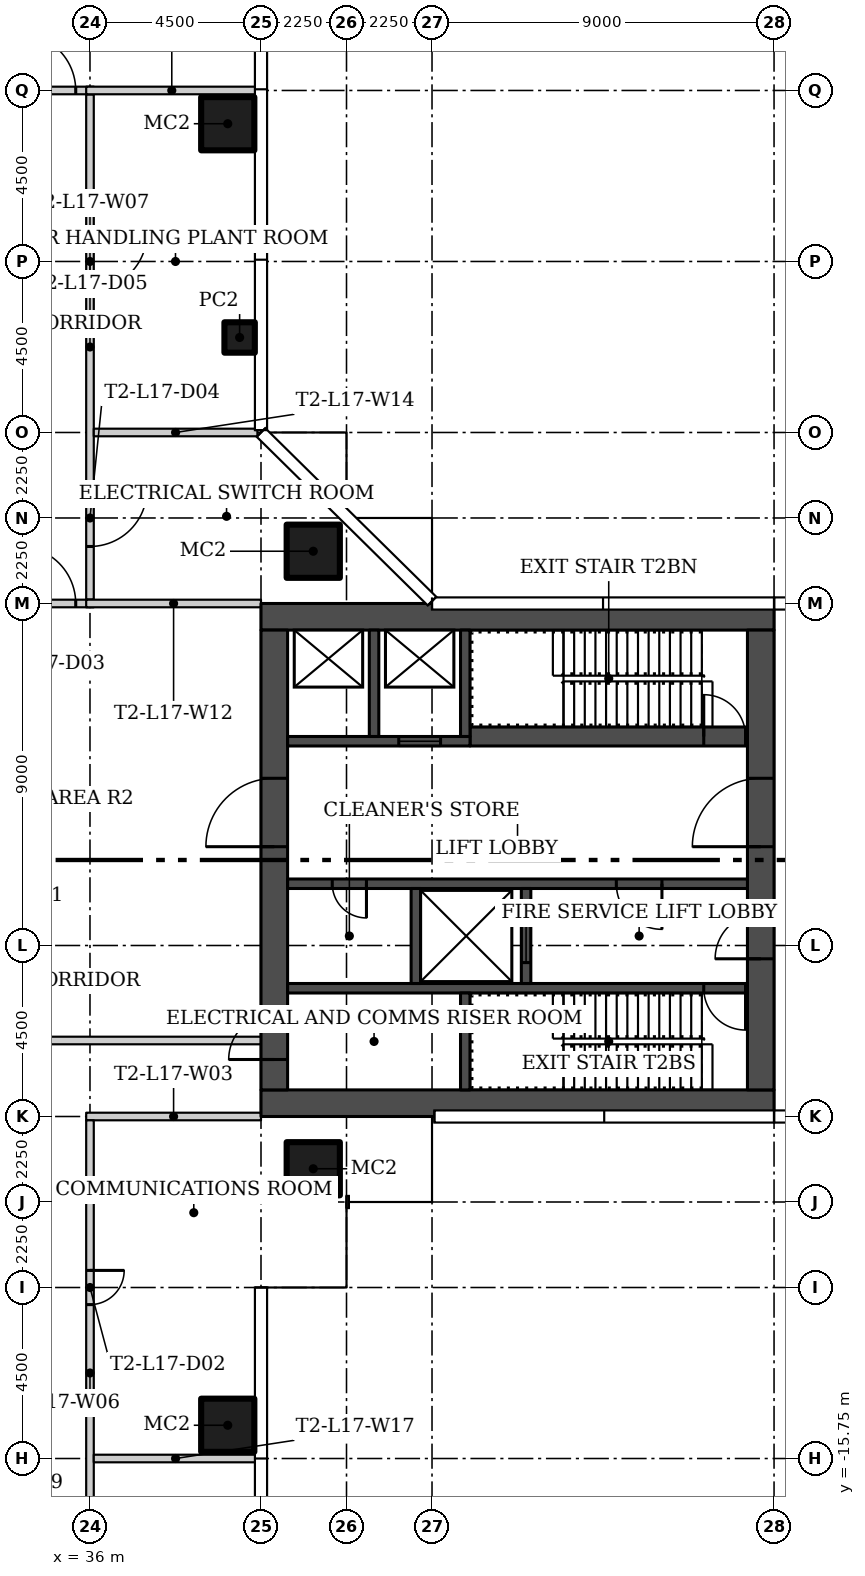
"""IFC4 building model, lengths in metres.
Left out: names, types, materials, properties, quantities, classifications, styles, units other than length and angle.
Written with IfcOpenShell. Run it as: python <this file> out.ifc"""

import sys

from ifc_helpers import new_model, si_unit, direction, frame, frame_2d, origin, origin_2d, place, context, subcontext, project, spatial, rectangle, hollow_rectangle, extrude, element, fill, save


model = new_model("IFC4")
c1 = context("Model", 3, precision=1e-05, world=origin(), true_north=direction((0.0, 1.0)))
c2 = subcontext(c1, "Body", "Model", "MODEL_VIEW")
j1 = project(units=[si_unit("LENGTHUNIT", "METRE"), si_unit("PLANEANGLEUNIT", "RADIAN")], contexts=[c1])
p1 = place(None, origin())
s1 = spatial("IfcSite", under=j1, at=p1, CompositionType="ELEMENT")
p2 = place(p1, origin())
s2 = spatial("IfcBuilding", under=s1, at=p2, CompositionType="ELEMENT")
p3 = place(p2, frame((0.0, 0.0, 77.1)))
s3 = spatial("IfcBuildingStorey", under=s2, at=p3, CompositionType="ELEMENT", Elevation=77.1)
for number, where in (
    (1, (41.875, 8.125, 0.0)),
    (2, (41.875, -8.125, 0.0)),
):
    element("IfcColumn", number, at=place(p3, frame(where)), inside=s3, PredefinedType="COLUMN", context=c2, shape_type="SweptSolid", body=[
        extrude(hollow_rectangle(XDim=1.4, YDim=1.4, WallThickness=0.05, at=origin_2d()), origin(), (0.0, 0.0, 1.0), 4.45),
    ])
p4 = place(p3, frame((39.938, 13.75, 0.0)))
e3 = element("IfcColumn", 3, at=p4, inside=s3, PredefinedType="COLUMN", context=c2, shape_type="SweptSolid", body=[
    extrude(hollow_rectangle(XDim=0.8, YDim=0.8, WallThickness=0.025, at=origin_2d()), origin(), (0.0, 0.0, 1.0), 4.45),
])
for number, where in (
    (4, (39.625, 19.375, 0.0)),
    (5, (39.625, -14.875, 0.0)),
):
    element("IfcColumn", number, at=place(p3, frame(where)), inside=s3, PredefinedType="COLUMN", context=c2, shape_type="SweptSolid", body=[
        extrude(hollow_rectangle(XDim=1.4, YDim=1.4, WallThickness=0.05, at=origin_2d()), origin(), (0.0, 0.0, 1.0), 4.45),
    ])
p5 = place(p3, frame((40.5, -4.75, 0.0), z_axis=(0.0, 0.0, 1.0), x_axis=(-1.0, 0.0, 0.0)))
e6 = element("IfcWall", 6, at=p5, inside=s3, PredefinedType="PARTITIONING", context=c2, shape_type="SweptSolid", body=[
    extrude(rectangle(XDim=13.5, YDim=0.2, at=frame_2d((6.75, 0.0))), origin(), (0.0, 0.0, 1.0), 4.45),
])
p6 = place(p5, frame((6.0, 0.0, 0.0)))
e7 = element("IfcOpeningElement", 7, at=p6, cuts=e6, PredefinedType="OPENING", context=c2, shape_type="SweptSolid", body=[
    extrude(rectangle(XDim=1.5, YDim=2.4, at=frame_2d((0.75, 1.2))), frame((0.0, 0.11, 0.0), z_axis=(0.0, -1.0, 0.0), x_axis=(1.0, 0.0, 0.0)), (0.0, 0.0, 1.0), 0.22),
])
p7 = place(p3, frame((40.5, -6.75, 0.0), z_axis=(0.0, 0.0, 1.0), x_axis=(-1.0, 0.0, 0.0)))
e8 = element("IfcWall", 8, at=p7, inside=s3, PredefinedType="PARTITIONING", context=c2, shape_type="SweptSolid", body=[
    extrude(rectangle(XDim=4.6, YDim=0.2, at=frame_2d((2.3, 0.0))), origin(), (0.0, 0.0, 1.0), 4.45),
])
p8 = place(p3, frame((36.0, -6.85, 0.0), z_axis=(0.0, 0.0, 1.0), x_axis=(0.0, -1.0, 0.0)))
e9 = element("IfcWall", 9, at=p8, inside=s3, PredefinedType="PARTITIONING", context=c2, shape_type="SweptSolid", body=[
    extrude(rectangle(XDim=13.3, YDim=0.2, at=frame_2d((6.65, 0.0))), origin(), (0.0, 0.0, 1.0), 4.45),
])
p9 = place(p8, frame((10.4, 0.0, 0.0)))
e10 = element("IfcOpeningElement", 10, at=p9, cuts=e9, PredefinedType="OPENING", context=c2, shape_type="SweptSolid", body=[
    extrude(rectangle(XDim=1.5, YDim=2.4, at=frame_2d((0.75, 1.2))), frame((0.0, 0.11, 0.0), z_axis=(0.0, -1.0, 0.0), x_axis=(1.0, 0.0, 0.0)), (0.0, 0.0, 1.0), 0.22),
])
p10 = place(p8, frame((3.95, 0.0, 0.0)))
e11 = element("IfcOpeningElement", 11, at=p10, cuts=e9, PredefinedType="OPENING", context=c2, shape_type="SweptSolid", body=[
    extrude(rectangle(XDim=0.9, YDim=2.1, at=frame_2d((0.45, 1.05))), frame((0.0, 0.11, 0.0), z_axis=(0.0, -1.0, 0.0), x_axis=(1.0, 0.0, 0.0)), (0.0, 0.0, 1.0), 0.22),
])
p11 = place(p3, frame((36.0, 20.15, 0.0), z_axis=(0.0, 0.0, 1.0), x_axis=(0.0, -1.0, 0.0)))
e12 = element("IfcWall", 12, at=p11, inside=s3, PredefinedType="PARTITIONING", context=c2, shape_type="SweptSolid", body=[
    extrude(rectangle(XDim=13.3, YDim=0.2, at=frame_2d((6.65, 0.0))), origin(), (0.0, 0.0, 1.0), 4.45),
])
p12 = place(p11, frame((10.4, 0.0, 0.0)))
e13 = element("IfcOpeningElement", 13, at=p12, cuts=e12, PredefinedType="OPENING", context=c2, shape_type="SweptSolid", body=[
    extrude(rectangle(XDim=1.5, YDim=2.4, at=frame_2d((0.75, 1.2))), frame((0.0, 0.11, 0.0), z_axis=(0.0, -1.0, 0.0), x_axis=(1.0, 0.0, 0.0)), (0.0, 0.0, 1.0), 0.22),
])
p13 = place(p11, frame((3.65, 0.0, 0.0)))
e14 = element("IfcOpeningElement", 14, at=p13, cuts=e12, PredefinedType="OPENING", context=c2, shape_type="SweptSolid", body=[
    extrude(rectangle(XDim=1.5, YDim=2.4, at=frame_2d((0.75, 1.2))), frame((0.0, 0.11, 0.0), z_axis=(0.0, -1.0, 0.0), x_axis=(1.0, 0.0, 0.0)), (0.0, 0.0, 1.0), 0.22),
])
p14 = place(p3, frame((33.65, 6.75, 0.0)))
e15 = element("IfcWall", 15, at=p14, inside=s3, PredefinedType="PARTITIONING", context=c2, shape_type="SweptSolid", body=[
    extrude(rectangle(XDim=2.45, YDim=0.2, at=frame_2d((1.225, 0.0))), origin(), (0.0, 0.0, 1.0), 4.45),
])
p15 = place(p14, frame((0.475, 0.0, 0.0)))
e16 = element("IfcOpeningElement", 16, at=p15, cuts=e15, PredefinedType="OPENING", context=c2, shape_type="SweptSolid", body=[
    extrude(rectangle(XDim=1.5, YDim=2.4, at=frame_2d((0.75, 1.2))), frame((0.0, 0.11, 0.0), z_axis=(0.0, -1.0, 0.0), x_axis=(1.0, 0.0, 0.0)), (0.0, 0.0, 1.0), 0.22),
])
p16 = place(p3, frame((33.65, 20.25, 0.0)))
e17 = element("IfcWall", 17, at=p16, inside=s3, PredefinedType="PARTITIONING", context=c2, shape_type="SweptSolid", body=[
    extrude(rectangle(XDim=2.45, YDim=0.2, at=frame_2d((1.225, 0.0))), origin(), (0.0, 0.0, 1.0), 4.45),
])
p17 = place(p16, frame((0.475, 0.0, 0.0)))
e18 = element("IfcOpeningElement", 18, at=p17, cuts=e17, PredefinedType="OPENING", context=c2, shape_type="SweptSolid", body=[
    extrude(rectangle(XDim=1.5, YDim=2.4, at=frame_2d((0.75, 1.2))), frame((0.0, 0.11, 0.0), z_axis=(0.0, -1.0, 0.0), x_axis=(1.0, 0.0, 0.0)), (0.0, 0.0, 1.0), 0.22),
])
p18 = place(p3, frame((40.5, 6.75, 0.0), z_axis=(0.0, 0.0, 1.0), x_axis=(-1.0, 0.0, 0.0)))
e19 = element("IfcWall", 19, at=p18, inside=s3, PredefinedType="PARTITIONING", context=c2, shape_type="SweptSolid", body=[
    extrude(rectangle(XDim=4.6, YDim=0.2, at=frame_2d((2.3, 0.0))), origin(), (0.0, 0.0, 1.0), 4.45),
])
p19 = place(p3, frame((40.405, 11.25, 0.0), z_axis=(0.0, 0.0, 1.0), x_axis=(-1.0, 0.0, 0.0)))
e20 = element("IfcWall", 20, at=p19, inside=s3, PredefinedType="PARTITIONING", context=c2, shape_type="SweptSolid", body=[
    extrude(rectangle(XDim=4.305, YDim=0.2, at=frame_2d((2.152, 0.0))), origin(), (0.0, 0.0, 1.0), 4.45),
])
p20 = place(p3, frame((40.405, 20.25, 0.0), z_axis=(0.0, 0.0, 1.0), x_axis=(-1.0, 0.0, 0.0)))
e21 = element("IfcWall", 21, at=p20, inside=s3, PredefinedType="PARTITIONING", context=c2, shape_type="SweptSolid", body=[
    extrude(rectangle(XDim=4.505, YDim=0.2, at=frame_2d((2.252, 0.0))), origin(), (0.0, 0.0, 1.0), 4.45),
])
p21 = place(p3, frame((36.1, -15.75, 0.0)))
e22 = element("IfcWall", 22, at=p21, inside=s3, PredefinedType="PARTITIONING", context=c2, shape_type="SweptSolid", body=[
    extrude(rectangle(XDim=4.305, YDim=0.2, at=frame_2d((2.152, 0.0))), origin(), (0.0, 0.0, 1.0), 4.45),
])
for number, where, z_axis, x_axis in (
    (23, (54.0, -6.4, 0.0), (0.0, 0.0, 1.0), (-1.0, 0.0, 0.0)),
    (24, (54.0, 6.4, 0.0), (0.0, 0.0, 1.0), (-1.0, 0.0, 0.0)),
):
    element("IfcWall", number, at=place(p3, frame(where, z_axis=z_axis, x_axis=x_axis)), inside=s3, PredefinedType="SHEAR", context=c2, shape_type="SweptSolid", body=[
        extrude(rectangle(XDim=13.5, YDim=0.7, at=frame_2d((6.75, 0.0))), origin(), (0.0, 0.0, 1.0), 4.45),
    ])
p22 = place(p3, frame((53.65, -6.05, 0.0), z_axis=(0.0, 0.0, 1.0), x_axis=(0.0, 1.0, 0.0)))
e25 = element("IfcWall", 25, at=p22, inside=s3, PredefinedType="SHEAR", context=c2, shape_type="SweptSolid", body=[
    extrude(rectangle(XDim=12.1, YDim=0.7, at=frame_2d((6.05, 0.0))), origin(), (0.0, 0.0, 1.0), 4.45),
])
p23 = place(p22, frame((3.45, 0.0, 0.0)))
e26 = element("IfcOpeningElement", 26, at=p23, cuts=e25, PredefinedType="OPENING", context=c2, shape_type="SweptSolid", body=[
    extrude(rectangle(XDim=1.2, YDim=2.1, at=frame_2d((0.6, 1.05))), frame((0.0, 0.36, 0.0), z_axis=(0.0, -1.0, 0.0), x_axis=(1.0, 0.0, 0.0)), (0.0, 0.0, 1.0), 0.72),
])
p24 = place(p22, frame((6.4, 0.0, 0.0)))
e27 = element("IfcOpeningElement", 27, at=p24, cuts=e25, PredefinedType="OPENING", context=c2, shape_type="SweptSolid", body=[
    extrude(rectangle(XDim=1.8, YDim=2.4, at=frame_2d((0.9, 1.2))), frame((0.0, 0.36, 0.0), z_axis=(0.0, -1.0, 0.0), x_axis=(1.0, 0.0, 0.0)), (0.0, 0.0, 1.0), 0.72),
])
p25 = place(p3, frame((40.85, -6.05, 0.0), z_axis=(0.0, 0.0, 1.0), x_axis=(0.0, 1.0, 0.0)))
e28 = element("IfcWall", 28, at=p25, inside=s3, PredefinedType="SHEAR", context=c2, shape_type="SweptSolid", body=[
    extrude(rectangle(XDim=12.1, YDim=0.7, at=frame_2d((6.05, 0.0))), origin(), (0.0, 0.0, 1.0), 4.45),
])
p26 = place(p25, frame((0.8, 0.0, 0.0)))
e29 = element("IfcOpeningElement", 29, at=p26, cuts=e28, PredefinedType="OPENING", context=c2, shape_type="SweptSolid", body=[
    extrude(rectangle(XDim=1.2, YDim=2.1, at=frame_2d((0.6, 1.05))), frame((0.0, 0.36, 0.0), z_axis=(0.0, -1.0, 0.0), x_axis=(1.0, 0.0, 0.0)), (0.0, 0.0, 1.0), 0.72),
])
p27 = place(p25, frame((6.4, 0.0, 0.0)))
e30 = element("IfcOpeningElement", 30, at=p27, cuts=e28, PredefinedType="OPENING", context=c2, shape_type="SweptSolid", body=[
    extrude(rectangle(XDim=1.8, YDim=2.4, at=frame_2d((0.9, 1.2))), frame((0.0, 0.36, 0.0), z_axis=(0.0, -1.0, 0.0), x_axis=(1.0, 0.0, 0.0)), (0.0, 0.0, 1.0), 0.72),
])
p28 = place(p3, frame((53.3, -3.375, 0.0), z_axis=(0.0, 0.0, 1.0), x_axis=(-1.0, 0.0, 0.0)))
e31 = element("IfcWall", 31, at=p28, inside=s3, PredefinedType="SHEAR", context=c2, shape_type="SweptSolid", body=[
    extrude(rectangle(XDim=12.1, YDim=0.25, at=frame_2d((6.05, 0.0))), origin(), (0.0, 0.0, 1.0), 4.45),
])
p29 = place(p28, frame((0.05, 0.0, 0.0)))
e32 = element("IfcOpeningElement", 32, at=p29, cuts=e31, PredefinedType="OPENING", context=c2, shape_type="SweptSolid", body=[
    extrude(rectangle(XDim=1.1, YDim=2.1, at=frame_2d((0.55, 1.05))), frame((0.0, 0.135, 0.0), z_axis=(0.0, -1.0, 0.0), x_axis=(1.0, 0.0, 0.0)), (0.0, 0.0, 1.0), 0.27),
])
p30 = place(p3, frame((45.875, -6.05, 0.0), z_axis=(0.0, 0.0, 1.0), x_axis=(0.0, 1.0, 0.0)))
e33 = element("IfcWall", 33, at=p30, inside=s3, PredefinedType="SHEAR", context=c2, shape_type="SweptSolid", body=[
    extrude(rectangle(XDim=2.55, YDim=0.25, at=frame_2d((1.275, 0.0))), origin(), (0.0, 0.0, 1.0), 4.45),
])
p31 = place(p3, frame((53.3, -0.625, 0.0), z_axis=(0.0, 0.0, 1.0), x_axis=(-1.0, 0.0, 0.0)))
e34 = element("IfcWall", 34, at=p31, inside=s3, PredefinedType="SHEAR", context=c2, shape_type="SweptSolid", body=[
    extrude(rectangle(XDim=12.1, YDim=0.25, at=frame_2d((6.05, 0.0))), origin(), (0.0, 0.0, 1.0), 4.45),
])
p32 = place(p31, frame((2.25, 0.0, 0.0)))
e35 = element("IfcOpeningElement", 35, at=p32, cuts=e34, PredefinedType="OPENING", context=c2, shape_type="SweptSolid", body=[
    extrude(rectangle(XDim=1.2, YDim=2.1, at=frame_2d((0.6, 1.05))), frame((0.0, 0.135, 0.0), z_axis=(0.0, -1.0, 0.0), x_axis=(1.0, 0.0, 0.0)), (0.0, 0.0, 1.0), 0.27),
])
p33 = place(p31, frame((10.025, 0.0, 0.0)))
e36 = element("IfcOpeningElement", 36, at=p33, cuts=e34, PredefinedType="OPENING", context=c2, shape_type="SweptSolid", body=[
    extrude(rectangle(XDim=0.9, YDim=2.1, at=frame_2d((0.45, 1.05))), frame((0.0, 0.135, 0.0), z_axis=(0.0, -1.0, 0.0), x_axis=(1.0, 0.0, 0.0)), (0.0, 0.0, 1.0), 0.27),
])
p34 = place(p3, frame((47.475, -3.25, 0.0), z_axis=(0.0, 0.0, 1.0), x_axis=(0.0, 1.0, 0.0)))
e37 = element("IfcWall", 37, at=p34, inside=s3, PredefinedType="SHEAR", context=c2, shape_type="SweptSolid", body=[
    extrude(rectangle(XDim=2.5, YDim=0.25, at=frame_2d((1.25, 0.0))), origin(), (0.0, 0.0, 1.0), 4.45),
])
p35 = place(p34, frame((0.55, 0.0, 0.0)))
e38 = element("IfcOpeningElement", 38, at=p35, cuts=e37, PredefinedType="OPENING", context=c2, shape_type="SweptSolid", body=[
    extrude(rectangle(XDim=1.4, YDim=2.4, at=frame_2d((0.7, 1.2))), frame((0.0, 0.135, 0.0), z_axis=(0.0, -1.0, 0.0), x_axis=(1.0, 0.0, 0.0)), (0.0, 0.0, 1.0), 0.27),
])
p36 = place(p3, frame((44.575, -3.25, 0.0), z_axis=(0.0, 0.0, 1.0), x_axis=(0.0, 1.0, 0.0)))
e39 = element("IfcWall", 39, at=p36, inside=s3, PredefinedType="SHEAR", context=c2, shape_type="SweptSolid", body=[
    extrude(rectangle(XDim=2.5, YDim=0.25, at=frame_2d((1.25, 0.0))), origin(), (0.0, 0.0, 1.0), 4.45),
])
p37 = place(p3, frame((46.0, 3.25, 0.0)))
e40 = element("IfcWall", 40, at=p37, inside=s3, PredefinedType="SHEAR", context=c2, shape_type="SweptSolid", body=[
    extrude(rectangle(XDim=7.3, YDim=0.5, at=frame_2d((3.65, 0.0))), origin(), (0.0, 0.0, 1.0), 4.45),
])
p38 = place(p37, frame((6.15, 0.0, 0.0)))
e41 = element("IfcOpeningElement", 41, at=p38, cuts=e40, PredefinedType="OPENING", context=c2, shape_type="SweptSolid", body=[
    extrude(rectangle(XDim=1.1, YDim=2.1, at=frame_2d((0.55, 1.05))), frame((0.0, 0.26, 0.0), z_axis=(0.0, -1.0, 0.0), x_axis=(1.0, 0.0, 0.0)), (0.0, 0.0, 1.0), 0.52),
])
p39 = place(p3, frame((46.0, 3.125, 0.0), z_axis=(0.0, 0.0, 1.0), x_axis=(-1.0, 0.0, 0.0)))
e42 = element("IfcWall", 42, at=p39, inside=s3, PredefinedType="SHEAR", context=c2, shape_type="SweptSolid", body=[
    extrude(rectangle(XDim=4.8, YDim=0.25, at=frame_2d((2.4, 0.0))), origin(), (0.0, 0.0, 1.0), 4.45),
])
p40 = place(p39, frame((0.775, 0.0, 0.0)))
e43 = element("IfcOpeningElement", 43, at=p40, cuts=e42, PredefinedType="OPENING", context=c2, shape_type="SweptSolid", body=[
    extrude(rectangle(XDim=1.1, YDim=2.1, at=frame_2d((0.55, 1.05))), frame((0.0, 0.135, 0.0), z_axis=(0.0, -1.0, 0.0), x_axis=(1.0, 0.0, 0.0)), (0.0, 0.0, 1.0), 0.27),
])
for number, where, z_axis, x_axis in (
    (44, (45.875, 3.25, 0.0), (0.0, 0.0, 1.0), (0.0, 1.0, 0.0)),
    (45, (43.475, 3.25, 0.0), (0.0, 0.0, 1.0), (0.0, 1.0, 0.0)),
):
    element("IfcWall", number, at=place(p3, frame(where, z_axis=z_axis, x_axis=x_axis)), inside=s3, PredefinedType="SHEAR", context=c2, shape_type="SweptSolid", body=[
        extrude(rectangle(XDim=2.8, YDim=0.25, at=frame_2d((1.4, 0.0))), origin(), (0.0, 0.0, 1.0), 4.45),
    ])
p41 = place(p10, origin())
e46 = element("IfcDoor", 46, at=p41, inside=s3, OperationType="SINGLE_SWING_LEFT", PredefinedType="DOOR", context=c2, shape_type="SweptSolid", body=[
    extrude(rectangle(XDim=0.9, YDim=2.1, at=frame_2d((0.45, 1.05))), frame((0.0, 0.025, 0.0), z_axis=(0.0, -1.0, 0.0), x_axis=(1.0, 0.0, 0.0)), (0.0, 0.0, 1.0), 0.05),
])
fill(e11, e46)
p42 = place(p15, origin())
e47 = element("IfcDoor", 47, at=p42, inside=s3, OperationType="DOUBLE_DOOR_SINGLE_SWING", PredefinedType="DOOR", context=c2, shape_type="SweptSolid", body=[
    extrude(rectangle(XDim=1.5, YDim=2.4, at=frame_2d((0.75, 1.2))), frame((0.0, 0.025, 0.0), z_axis=(0.0, -1.0, 0.0), x_axis=(1.0, 0.0, 0.0)), (0.0, 0.0, 1.0), 0.05),
])
fill(e16, e47)
p43 = place(p12, origin())
e48 = element("IfcDoor", 48, at=p43, inside=s3, OperationType="DOUBLE_DOOR_SINGLE_SWING", PredefinedType="DOOR", context=c2, shape_type="SweptSolid", body=[
    extrude(rectangle(XDim=1.5, YDim=2.4, at=frame_2d((0.75, 1.2))), frame((0.0, 0.025, 0.0), z_axis=(0.0, -1.0, 0.0), x_axis=(1.0, 0.0, 0.0)), (0.0, 0.0, 1.0), 0.05),
])
fill(e13, e48)
p44 = place(p13, origin())
e49 = element("IfcDoor", 49, at=p44, inside=s3, OperationType="DOUBLE_DOOR_SINGLE_SWING", PredefinedType="DOOR", context=c2, shape_type="SweptSolid", body=[
    extrude(rectangle(XDim=1.5, YDim=2.4, at=frame_2d((0.75, 1.2))), frame((0.0, 0.025, 0.0), z_axis=(0.0, -1.0, 0.0), x_axis=(1.0, 0.0, 0.0)), (0.0, 0.0, 1.0), 0.05),
])
fill(e14, e49)
p45 = place(p17, origin())
e50 = element("IfcDoor", 50, at=p45, inside=s3, OperationType="DOUBLE_DOOR_SINGLE_SWING", PredefinedType="DOOR", context=c2, shape_type="SweptSolid", body=[
    extrude(rectangle(XDim=1.5, YDim=2.4, at=frame_2d((0.75, 1.2))), frame((0.0, 0.025, 0.0), z_axis=(0.0, -1.0, 0.0), x_axis=(1.0, 0.0, 0.0)), (0.0, 0.0, 1.0), 0.05),
])
fill(e18, e50)
p46 = place(p23, origin())
e51 = element("IfcDoor", 51, at=p46, inside=s3, OperationType="SINGLE_SWING_LEFT", PredefinedType="DOOR", context=c2, shape_type="SweptSolid", body=[
    extrude(rectangle(XDim=1.2, YDim=2.1, at=frame_2d((0.6, 1.05))), frame((0.0, 0.025, 0.0), z_axis=(0.0, -1.0, 0.0), x_axis=(1.0, 0.0, 0.0)), (0.0, 0.0, 1.0), 0.05),
])
fill(e26, e51)
p47 = place(p24, origin())
e52 = element("IfcDoor", 52, at=p47, inside=s3, OperationType="DOUBLE_DOOR_SINGLE_SWING", PredefinedType="DOOR", context=c2, shape_type="SweptSolid", body=[
    extrude(rectangle(XDim=1.8, YDim=2.4, at=frame_2d((0.9, 1.2))), frame((0.0, 0.025, 0.0), z_axis=(0.0, -1.0, 0.0), x_axis=(1.0, 0.0, 0.0)), (0.0, 0.0, 1.0), 0.05),
])
fill(e27, e52)
p48 = place(p26, origin())
e53 = element("IfcDoor", 53, at=p48, inside=s3, OperationType="SINGLE_SWING_LEFT", PredefinedType="DOOR", context=c2, shape_type="SweptSolid", body=[
    extrude(rectangle(XDim=1.2, YDim=2.1, at=frame_2d((0.6, 1.05))), frame((0.0, 0.025, 0.0), z_axis=(0.0, -1.0, 0.0), x_axis=(1.0, 0.0, 0.0)), (0.0, 0.0, 1.0), 0.05),
])
fill(e29, e53)
p49 = place(p27, origin())
e54 = element("IfcDoor", 54, at=p49, inside=s3, OperationType="DOUBLE_DOOR_SINGLE_SWING", PredefinedType="DOOR", context=c2, shape_type="SweptSolid", body=[
    extrude(rectangle(XDim=1.8, YDim=2.4, at=frame_2d((0.9, 1.2))), frame((0.0, 0.025, 0.0), z_axis=(0.0, -1.0, 0.0), x_axis=(1.0, 0.0, 0.0)), (0.0, 0.0, 1.0), 0.05),
])
fill(e30, e54)
p50 = place(p29, origin())
e55 = element("IfcDoor", 55, at=p50, inside=s3, OperationType="SINGLE_SWING_LEFT", PredefinedType="DOOR", context=c2, shape_type="SweptSolid", body=[
    extrude(rectangle(XDim=1.1, YDim=2.1, at=frame_2d((0.55, 1.05))), frame((0.0, 0.025, 0.0), z_axis=(0.0, -1.0, 0.0), x_axis=(1.0, 0.0, 0.0)), (0.0, 0.0, 1.0), 0.05),
])
fill(e32, e55)
p51 = place(p32, origin())
e56 = element("IfcDoor", 56, at=p51, inside=s3, OperationType="SINGLE_SWING_LEFT", PredefinedType="DOOR", context=c2, shape_type="SweptSolid", body=[
    extrude(rectangle(XDim=1.2, YDim=2.1, at=frame_2d((0.6, 1.05))), frame((0.0, 0.025, 0.0), z_axis=(0.0, -1.0, 0.0), x_axis=(1.0, 0.0, 0.0)), (0.0, 0.0, 1.0), 0.05),
])
fill(e35, e56)
p52 = place(p33, origin())
e57 = element("IfcDoor", 57, at=p52, inside=s3, OperationType="SINGLE_SWING_RIGHT", PredefinedType="DOOR", context=c2, shape_type="SweptSolid", body=[
    extrude(rectangle(XDim=0.9, YDim=2.1, at=frame_2d((0.45, 1.05))), frame((0.0, 0.025, 0.0), z_axis=(0.0, -1.0, 0.0), x_axis=(1.0, 0.0, 0.0)), (0.0, 0.0, 1.0), 0.05),
])
fill(e36, e57)
p53 = place(p35, origin())
e58 = element("IfcDoor", 58, at=p53, inside=s3, OperationType="SLIDING_TO_LEFT", PredefinedType="DOOR", context=c2, shape_type="SweptSolid", body=[
    extrude(rectangle(XDim=1.4, YDim=2.4, at=frame_2d((0.7, 1.2))), frame((0.0, 0.025, 0.0), z_axis=(0.0, -1.0, 0.0), x_axis=(1.0, 0.0, 0.0)), (0.0, 0.0, 1.0), 0.05),
])
fill(e38, e58)
p54 = place(p38, origin())
e59 = element("IfcDoor", 59, at=p54, inside=s3, OperationType="SINGLE_SWING_RIGHT", PredefinedType="DOOR", context=c2, shape_type="SweptSolid", body=[
    extrude(rectangle(XDim=1.1, YDim=2.1, at=frame_2d((0.55, 1.05))), frame((0.0, 0.025, 0.0), z_axis=(0.0, -1.0, 0.0), x_axis=(1.0, 0.0, 0.0)), (0.0, 0.0, 1.0), 0.05),
])
fill(e41, e59)
p55 = place(p40, origin())
e60 = element("IfcDoor", 60, at=p55, inside=s3, OperationType="SLIDING_TO_LEFT", PredefinedType="DOOR", context=c2, shape_type="SweptSolid", body=[
    extrude(rectangle(XDim=1.1, YDim=2.1, at=frame_2d((0.55, 1.05))), frame((0.0, 0.025, 0.0), z_axis=(0.0, -1.0, 0.0), x_axis=(1.0, 0.0, 0.0)), (0.0, 0.0, 1.0), 0.05),
])
fill(e43, e60)
save(model, sys.argv[1])
